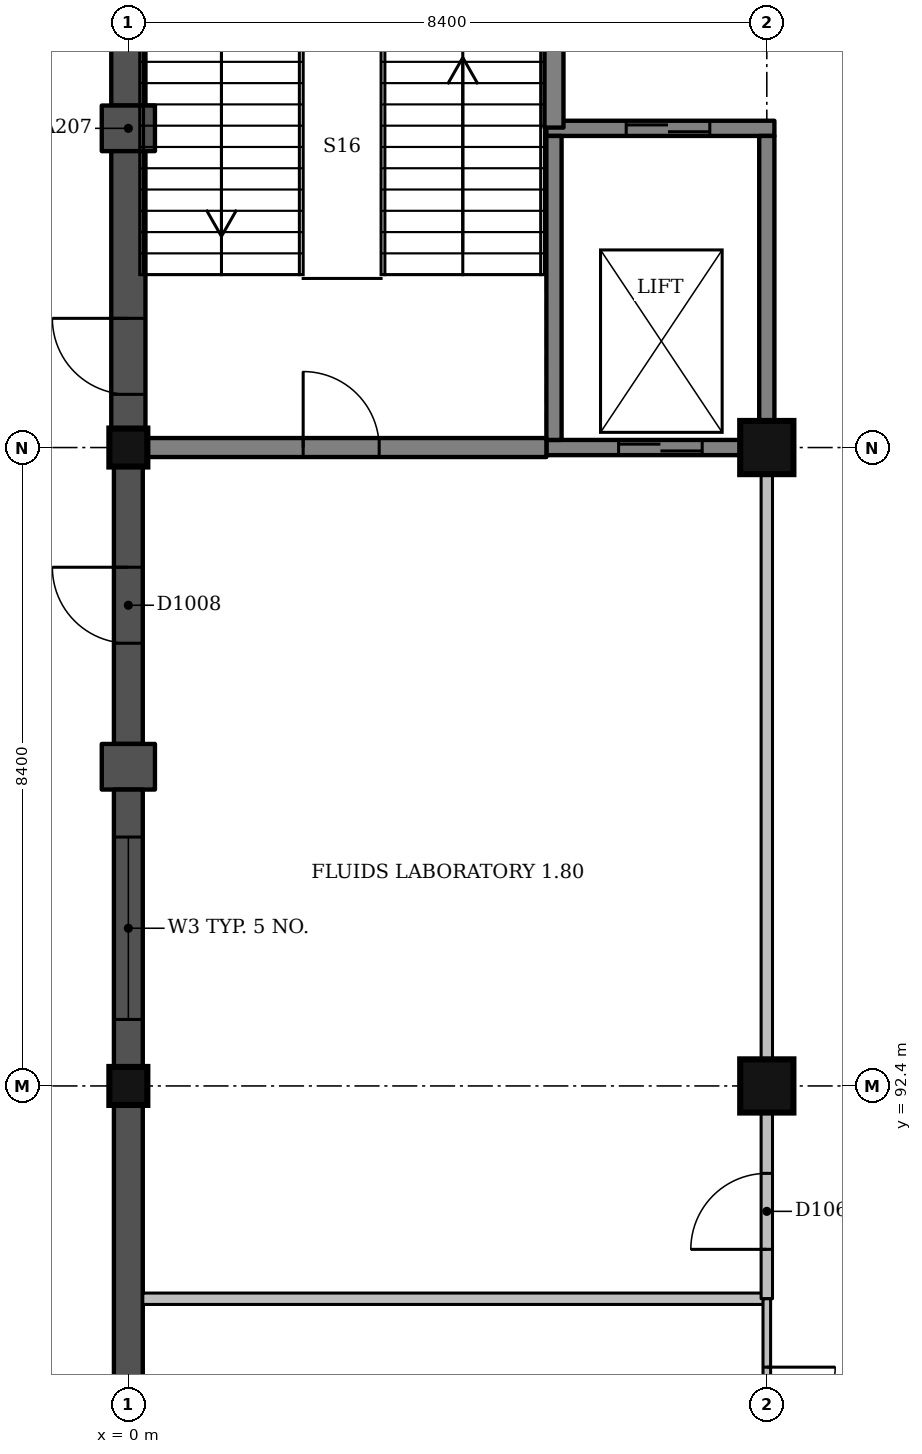
"""IFC4 building model, lengths in metres.
Left out: names, types, materials, properties, quantities, classifications, styles, units other than length and angle.
Written with IfcOpenShell. Run it as: python <this file> out.ifc"""

import sys

from ifc_helpers import new_model, si_unit, direction, frame, frame_2d, origin, origin_2d, place, context, subcontext, project, spatial, rectangle, extrude, element, fill, save


model = new_model("IFC4")
c1 = context("Model", 3, precision=1e-05, world=origin(), true_north=direction((0.0, 1.0)))
c2 = subcontext(c1, "Body", "Model", "MODEL_VIEW")
j1 = project(units=[si_unit("LENGTHUNIT", "METRE"), si_unit("PLANEANGLEUNIT", "RADIAN")], contexts=[c1])
p1 = place(None, origin())
s1 = spatial("IfcSite", under=j1, at=p1, CompositionType="ELEMENT")
p2 = place(p1, origin())
s2 = spatial("IfcBuilding", under=s1, at=p2, CompositionType="ELEMENT")
p3 = place(p2, frame((0.0, 0.0, 4.5)))
s3 = spatial("IfcBuildingStorey", under=s2, at=p3, CompositionType="ELEMENT", Elevation=4.5)
for number, where, z_axis, x_axis in (
    (1, (0.0, 92.4, -1.5), (0.0, 0.0, 1.0), (1.0, 0.0, 0.0)),
    (2, (0.0, 100.8, -1.5), (0.0, 0.0, 1.0), (1.0, 0.0, 0.0)),
):
    element("IfcColumn", number, at=place(p3, frame(where, z_axis=z_axis, x_axis=x_axis)), inside=s3, PredefinedType="COLUMN", context=c2, shape_type="SweptSolid", body=[
        extrude(rectangle(XDim=0.5, YDim=0.5, at=origin_2d()), origin(), (0.0, 0.0, 1.0), 6.0),
    ])
for number, where, z_axis, x_axis in (
    (3, (8.4, 92.4, -1.5), (0.0, 0.0, 1.0), (1.0, 0.0, 0.0)),
    (4, (8.4, 100.8, -1.5), (0.0, 0.0, 1.0), (1.0, 0.0, 0.0)),
):
    element("IfcColumn", number, at=place(p3, frame(where, z_axis=z_axis, x_axis=x_axis)), inside=s3, PredefinedType="COLUMN", context=c2, shape_type="SweptSolid", body=[
        extrude(rectangle(XDim=0.7, YDim=0.7, at=origin_2d()), origin(), (0.0, 0.0, 1.0), 6.0),
    ])
p4 = place(p3, frame((5.5, 100.8, 0.0), z_axis=(0.0, 0.0, 1.0), x_axis=(1.0, 0.0, 0.0)))
e5 = element("IfcWall", 5, at=p4, inside=s3, PredefinedType="SHEAR", context=c2, shape_type="SweptSolid", body=[
    extrude(rectangle(XDim=2.55, YDim=0.2, at=frame_2d((1.275, 0.0))), origin(), (0.0, 0.0, 1.0), 4.5),
])
p5 = place(p4, frame((0.95, 0.0, 0.0)))
e6 = element("IfcOpeningElement", 6, at=p5, cuts=e5, PredefinedType="OPENING", context=c2, shape_type="SweptSolid", body=[
    extrude(rectangle(XDim=1.1, YDim=2.1, at=frame_2d((0.55, 1.05))), frame((0.0, 0.11, 0.0), z_axis=(0.0, -1.0, 0.0), x_axis=(1.0, 0.0, 0.0)), (0.0, 0.0, 1.0), 0.22),
])
p6 = place(p3, frame((5.5, 105.0, 0.0), z_axis=(0.0, 0.0, 1.0), x_axis=(1.0, 0.0, 0.0)))
e7 = element("IfcWall", 7, at=p6, inside=s3, PredefinedType="SHEAR", context=c2, shape_type="SweptSolid", body=[
    extrude(rectangle(XDim=3.0, YDim=0.2, at=frame_2d((1.5, 0.0))), origin(), (0.0, 0.0, 1.0), 4.5),
])
p7 = place(p6, frame((1.05, 0.0, 0.0)))
e8 = element("IfcOpeningElement", 8, at=p7, cuts=e7, PredefinedType="OPENING", context=c2, shape_type="SweptSolid", body=[
    extrude(rectangle(XDim=1.1, YDim=2.1, at=frame_2d((0.55, 1.05))), frame((0.0, 0.11, 0.0), z_axis=(0.0, -1.0, 0.0), x_axis=(1.0, 0.0, 0.0)), (0.0, 0.0, 1.0), 0.22),
])
p8 = place(p3, frame((5.6, 100.9, 0.0), z_axis=(0.0, 0.0, 1.0), x_axis=(0.0, 1.0, 0.0)))
e9 = element("IfcWall", 9, at=p8, inside=s3, PredefinedType="SHEAR", context=c2, shape_type="SweptSolid", body=[
    extrude(rectangle(XDim=4.0, YDim=0.2, at=frame_2d((2.0, 0.0))), origin(), (0.0, 0.0, 1.0), 4.5),
])
p9 = place(p3, frame((8.4, 101.15, 0.0), z_axis=(0.0, 0.0, 1.0), x_axis=(0.0, 1.0, 0.0)))
e10 = element("IfcWall", 10, at=p9, inside=s3, PredefinedType="SHEAR", context=c2, shape_type="SweptSolid", body=[
    extrude(rectangle(XDim=3.75, YDim=0.2, at=frame_2d((1.875, 0.0))), origin(), (0.0, 0.0, 1.0), 4.5),
])
p10 = place(p3, frame((0.25, 100.8, 0.0), z_axis=(0.0, 0.0, 1.0), x_axis=(1.0, 0.0, 0.0)))
e11 = element("IfcWall", 11, at=p10, inside=s3, PredefinedType="SHEAR", context=c2, shape_type="SweptSolid", body=[
    extrude(rectangle(XDim=5.25, YDim=0.25, at=frame_2d((2.625, 0.0))), origin(), (0.0, 0.0, 1.0), 4.5),
])
p11 = place(p10, frame((2.05, 0.0, 0.0)))
e12 = element("IfcOpeningElement", 12, at=p11, cuts=e11, PredefinedType="OPENING", context=c2, shape_type="SweptSolid", body=[
    extrude(rectangle(XDim=1.0, YDim=2.1, at=frame_2d((0.5, 1.05))), frame((0.0, 0.135, 0.0), z_axis=(0.0, -1.0, 0.0), x_axis=(1.0, 0.0, 0.0)), (0.0, 0.0, 1.0), 0.27),
])
p12 = place(p3, frame((5.6, 105.01, 0.0), z_axis=(0.0, 0.0, 1.0), x_axis=(0.0, 1.0, 0.0)))
e13 = element("IfcWall", 13, at=p12, inside=s3, PredefinedType="SHEAR", context=c2, shape_type="SweptSolid", body=[
    extrude(rectangle(XDim=4.065, YDim=0.25, at=frame_2d((2.032, 0.0))), origin(), (0.0, 0.0, 1.0), 4.5),
])
p13 = place(p3, frame((0.0, 108.95, 0.0), z_axis=(0.0, 0.0, 1.0), x_axis=(0.0, -1.0, 0.0)))
e14 = element("IfcWall", 14, at=p13, inside=s3, PredefinedType="SOLIDWALL", context=c2, shape_type="SweptSolid", body=[
    extrude(rectangle(XDim=3.65, YDim=0.45, at=frame_2d((1.825, 0.0))), origin(), (0.0, 0.0, 1.0), 3.65),
])
p14 = place(p3, frame((0.0, 105.3, 0.0), z_axis=(0.0, 0.0, 1.0), x_axis=(0.0, -1.0, 0.0)))
e15 = element("IfcWall", 15, at=p14, inside=s3, PredefinedType="SOLIDWALL", context=c2, shape_type="SweptSolid", body=[
    extrude(rectangle(XDim=0.6, YDim=0.7, at=frame_2d((0.3, 0.0))), origin(), (0.0, 0.0, 1.0), 3.65),
])
p15 = place(p3, frame((0.0, 104.7, 0.0), z_axis=(0.0, 0.0, 1.0), x_axis=(0.0, -1.0, 0.0)))
e16 = element("IfcWall", 16, at=p15, inside=s3, PredefinedType="SOLIDWALL", context=c2, shape_type="SweptSolid", body=[
    extrude(rectangle(XDim=3.65, YDim=0.45, at=frame_2d((1.825, 0.0))), origin(), (0.0, 0.0, 1.0), 3.65),
])
p16 = place(p15, frame((3.2, 0.0, 0.0), z_axis=(0.0, 0.0, 1.0), x_axis=(-1.0, 0.0, 0.0)))
e17 = element("IfcOpeningElement", 17, at=p16, cuts=e16, PredefinedType="OPENING", context=c2, shape_type="SweptSolid", body=[
    extrude(rectangle(XDim=1.0, YDim=2.1, at=frame_2d((0.5, 1.05))), frame((0.0, 0.235, 0.0), z_axis=(0.0, -1.0, 0.0), x_axis=(1.0, 0.0, 0.0)), (0.0, 0.0, 1.0), 0.47),
])
p17 = place(p3, frame((0.0, 100.55, 0.0), z_axis=(0.0, 0.0, 1.0), x_axis=(0.0, -1.0, 0.0)))
e18 = element("IfcWall", 18, at=p17, inside=s3, PredefinedType="SOLIDWALL", context=c2, shape_type="SweptSolid", body=[
    extrude(rectangle(XDim=3.65, YDim=0.38, at=frame_2d((1.825, 0.0))), origin(), (0.0, 0.0, 1.0), 3.35),
])
p18 = place(p17, frame((1.325, 0.0, 0.0)))
e19 = element("IfcOpeningElement", 19, at=p18, cuts=e18, PredefinedType="OPENING", context=c2, shape_type="SweptSolid", body=[
    extrude(rectangle(XDim=1.0, YDim=2.1, at=frame_2d((0.5, 1.05))), frame((0.0, 0.2, 0.0), z_axis=(0.0, -1.0, 0.0), x_axis=(1.0, 0.0, 0.0)), (0.0, 0.0, 1.0), 0.4),
])
p19 = place(p3, frame((0.0, 96.9, 0.0), z_axis=(0.0, 0.0, 1.0), x_axis=(0.0, -1.0, 0.0)))
e20 = element("IfcWall", 20, at=p19, inside=s3, PredefinedType="SOLIDWALL", context=c2, shape_type="SweptSolid", body=[
    extrude(rectangle(XDim=0.6, YDim=0.7, at=frame_2d((0.3, 0.0))), origin(), (0.0, 0.0, 1.0), 3.35),
])
p20 = place(p3, frame((0.0, 96.3, 0.0), z_axis=(0.0, 0.0, 1.0), x_axis=(0.0, -1.0, 0.0)))
e21 = element("IfcWall", 21, at=p20, inside=s3, PredefinedType="SOLIDWALL", context=c2, shape_type="SweptSolid", body=[
    extrude(rectangle(XDim=3.65, YDim=0.38, at=frame_2d((1.825, 0.0))), origin(), (0.0, 0.0, 1.0), 3.35),
])
p21 = place(p20, frame((0.625, 0.0, 1.2)))
e22 = element("IfcOpeningElement", 22, at=p21, cuts=e21, PredefinedType="OPENING", context=c2, shape_type="SweptSolid", body=[
    extrude(rectangle(XDim=2.4, YDim=1.5, at=frame_2d((1.2, 0.75))), frame((0.0, 0.2, 0.0), z_axis=(0.0, -1.0, 0.0), x_axis=(1.0, 0.0, 0.0)), (0.0, 0.0, 1.0), 0.4),
])
p22 = place(p3, frame((0.0, 92.15, 0.0), z_axis=(0.0, 0.0, 1.0), x_axis=(0.0, -1.0, 0.0)))
e23 = element("IfcWall", 23, at=p22, inside=s3, PredefinedType="SOLIDWALL", context=c2, shape_type="SweptSolid", body=[
    extrude(rectangle(XDim=3.65, YDim=0.38, at=frame_2d((1.825, 0.0))), origin(), (0.0, 0.0, 1.0), 3.35),
])
p23 = place(p3, frame((0.19, 89.6, 0.0), z_axis=(0.0, 0.0, 1.0), x_axis=(1.0, 0.0, 0.0)))
e24 = element("IfcWall", 24, at=p23, inside=s3, PredefinedType="PARTITIONING", context=c2, shape_type="SweptSolid", body=[
    extrude(rectangle(XDim=8.21, YDim=0.15, at=frame_2d((4.105, 0.0))), origin(), (0.0, 0.0, 1.0), 3.35),
])
p24 = place(p3, frame((8.4, 89.6, 0.0), z_axis=(0.0, 0.0, 1.0), x_axis=(0.0, 1.0, 0.0)))
e25 = element("IfcWall", 25, at=p24, inside=s3, PredefinedType="PARTITIONING", context=c2, shape_type="SweptSolid", body=[
    extrude(rectangle(XDim=2.45, YDim=0.15, at=frame_2d((1.225, 0.0))), origin(), (0.0, 0.0, 1.0), 3.4),
])
p25 = place(p24, frame((0.65, 0.0, 0.0)))
e26 = element("IfcOpeningElement", 26, at=p25, cuts=e25, PredefinedType="OPENING", context=c2, shape_type="SweptSolid", body=[
    extrude(rectangle(XDim=1.0, YDim=2.1, at=frame_2d((0.5, 1.05))), frame((0.0, 0.085, 0.0), z_axis=(0.0, -1.0, 0.0), x_axis=(1.0, 0.0, 0.0)), (0.0, 0.0, 1.0), 0.17),
])
p26 = place(p3, frame((8.4, 92.75, 0.0), z_axis=(0.0, 0.0, 1.0), x_axis=(0.0, 1.0, 0.0)))
e27 = element("IfcWall", 27, at=p26, inside=s3, PredefinedType="PARTITIONING", context=c2, shape_type="SweptSolid", body=[
    extrude(rectangle(XDim=7.7, YDim=0.15, at=frame_2d((3.85, 0.0))), origin(), (0.0, 0.0, 1.0), 3.4),
])
p27 = place(p3, frame((8.4, 84.35, 0.0), z_axis=(0.0, 0.0, 1.0), x_axis=(0.0, 1.0, 0.0)))
e28 = element("IfcWall", 28, at=p27, inside=s3, PredefinedType="PARTITIONING", context=c2, shape_type="SweptSolid", body=[
    extrude(rectangle(XDim=5.25, YDim=0.1, at=frame_2d((2.625, 0.0))), origin(), (0.0, 0.0, 1.0), 3.4),
])
p28 = place(p27, frame((0.65, 0.0, 0.0)))
e29 = element("IfcOpeningElement", 29, at=p28, cuts=e28, PredefinedType="OPENING", context=c2, shape_type="SweptSolid", body=[
    extrude(rectangle(XDim=1.0, YDim=2.1, at=frame_2d((0.5, 1.05))), frame((0.0, 0.06, 0.0), z_axis=(0.0, -1.0, 0.0), x_axis=(1.0, 0.0, 0.0)), (0.0, 0.0, 1.0), 0.12),
])
p29 = place(p27, frame((3.45, 0.0, 0.0)))
e30 = element("IfcOpeningElement", 30, at=p29, cuts=e28, PredefinedType="OPENING", context=c2, shape_type="SweptSolid", body=[
    extrude(rectangle(XDim=0.9, YDim=2.1, at=frame_2d((0.45, 1.05))), frame((0.0, 0.06, 0.0), z_axis=(0.0, -1.0, 0.0), x_axis=(1.0, 0.0, 0.0)), (0.0, 0.0, 1.0), 0.12),
])
p30 = place(p18, origin())
e31 = element("IfcDoor", 31, at=p30, inside=s3, OperationType="SINGLE_SWING_LEFT", PredefinedType="DOOR", context=c2, shape_type="SweptSolid", body=[
    extrude(rectangle(XDim=1.0, YDim=2.1, at=frame_2d((0.5, 1.05))), frame((0.0, 0.025, 0.0), z_axis=(0.0, -1.0, 0.0), x_axis=(1.0, 0.0, 0.0)), (0.0, 0.0, 1.0), 0.05),
])
fill(e19, e31)
p31 = place(p21, origin())
e32 = element("IfcWindow", 32, at=p31, inside=s3, PartitioningType="SINGLE_PANEL", PredefinedType="WINDOW", context=c2, shape_type="SweptSolid", body=[
    extrude(rectangle(XDim=2.4, YDim=1.5, at=frame_2d((1.2, 0.75))), frame((0.0, 0.15, 0.0), z_axis=(0.0, -1.0, 0.0), x_axis=(1.0, 0.0, 0.0)), (0.0, 0.0, 1.0), 0.06),
])
fill(e22, e32)
p32 = place(p29, origin())
e33 = element("IfcDoor", 33, at=p32, inside=s3, OperationType="SINGLE_SWING_RIGHT", PredefinedType="DOOR", context=c2, shape_type="SweptSolid", body=[
    extrude(rectangle(XDim=0.9, YDim=2.1, at=frame_2d((0.45, 1.05))), frame((0.0, 0.025, 0.0), z_axis=(0.0, -1.0, 0.0), x_axis=(1.0, 0.0, 0.0)), (0.0, 0.0, 1.0), 0.05),
])
fill(e30, e33)
p33 = place(p25, origin())
e34 = element("IfcDoor", 34, at=p33, inside=s3, OperationType="SINGLE_SWING_LEFT", PredefinedType="DOOR", context=c2, shape_type="SweptSolid", body=[
    extrude(rectangle(XDim=1.0, YDim=2.1, at=frame_2d((0.5, 1.05))), frame((0.0, 0.025, 0.0), z_axis=(0.0, -1.0, 0.0), x_axis=(1.0, 0.0, 0.0)), (0.0, 0.0, 1.0), 0.05),
])
fill(e26, e34)
p34 = place(p11, origin())
e35 = element("IfcDoor", 35, at=p34, inside=s3, OperationType="SINGLE_SWING_LEFT", PredefinedType="DOOR", context=c2, shape_type="SweptSolid", body=[
    extrude(rectangle(XDim=1.0, YDim=2.1, at=frame_2d((0.5, 1.05))), frame((0.0, 0.025, 0.0), z_axis=(0.0, -1.0, 0.0), x_axis=(1.0, 0.0, 0.0)), (0.0, 0.0, 1.0), 0.05),
])
fill(e12, e35)
p35 = place(p16, origin())
e36 = element("IfcDoor", 36, at=p35, inside=s3, OperationType="SINGLE_SWING_LEFT", PredefinedType="DOOR", context=c2, shape_type="SweptSolid", body=[
    extrude(rectangle(XDim=1.0, YDim=2.1, at=frame_2d((0.5, 1.05))), frame((0.0, 0.025, 0.0), z_axis=(0.0, -1.0, 0.0), x_axis=(1.0, 0.0, 0.0)), (0.0, 0.0, 1.0), 0.05),
])
fill(e17, e36)
p36 = place(p5, origin())
e37 = element("IfcDoor", 37, at=p36, inside=s3, OperationType="SLIDING_TO_LEFT", PredefinedType="DOOR", context=c2, shape_type="SweptSolid", body=[
    extrude(rectangle(XDim=1.1, YDim=2.1, at=frame_2d((0.55, 1.05))), frame((0.0, 0.025, 0.0), z_axis=(0.0, -1.0, 0.0), x_axis=(1.0, 0.0, 0.0)), (0.0, 0.0, 1.0), 0.05),
])
fill(e6, e37)
p37 = place(p7, origin())
e38 = element("IfcDoor", 38, at=p37, inside=s3, OperationType="SLIDING_TO_RIGHT", PredefinedType="DOOR", context=c2, shape_type="SweptSolid", body=[
    extrude(rectangle(XDim=1.1, YDim=2.1, at=frame_2d((0.55, 1.05))), frame((0.0, 0.025, 0.0), z_axis=(0.0, -1.0, 0.0), x_axis=(1.0, 0.0, 0.0)), (0.0, 0.0, 1.0), 0.05),
])
fill(e8, e38)
save(model, sys.argv[1])
